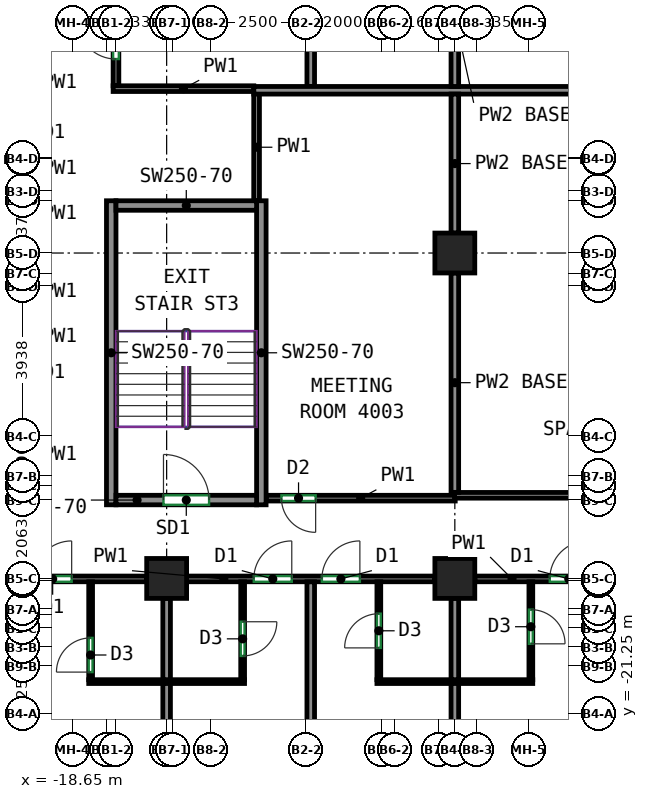
"""IFC4 building model, lengths in metres.
Left out: names, types, materials, properties, quantities, classifications, styles, units other than length and angle.
Written with IfcOpenShell. Run it as: python <this file> out.ifc"""

import sys

from ifc_helpers import new_model, si_unit, direction, frame, frame_2d, origin, origin_2d, place, context, subcontext, project, spatial, rectangle, extrude, source, transform, mapped, element, fill, save


model = new_model("IFC4")
c1 = context("Model", 3, precision=1e-05, world=origin(), true_north=direction((0.0, 1.0)))
c2 = subcontext(c1, "Body", "Model", "MODEL_VIEW")
j1 = project(units=[si_unit("LENGTHUNIT", "METRE"), si_unit("PLANEANGLEUNIT", "RADIAN")], contexts=[c1])
p1 = place(None, origin())
s1 = spatial("IfcSite", under=j1, at=p1, CompositionType="ELEMENT")
p2 = place(p1, origin())
s2 = spatial("IfcBuilding", under=s1, at=p2, CompositionType="ELEMENT")
p3 = place(p2, frame((0.0, 0.0, 171.9)))
s3 = spatial("IfcBuildingStorey", under=s2, at=p3, CompositionType="ELEMENT", Elevation=171.9)
m1 = source(origin(), c2, "Body", "SweptSolid", [
    extrude(rectangle(XDim=1.05, YDim=1.05, at=origin_2d()), origin(), (0.0, 0.0, 1.0), 3.12),
])
for number, where, z_axis, x_axis in (
    (1, (-16.167, -17.688, 0.0), (0.0, 0.0, 1.0), (1.0, 0.0, 0.0)),
    (2, (-8.583, -17.688, 0.0), (0.0, 0.0, 1.0), (1.0, 0.0, 0.0)),
    (3, (-8.583, -9.125, 0.0), (0.0, 0.0, 1.0), (1.0, 0.0, 0.0)),
):
    element("IfcColumn", number, at=place(p3, frame(where, z_axis=z_axis, x_axis=x_axis)), inside=s3, PredefinedType="COLUMN", context=c2, shape_type="MappedRepresentation", body=[
        mapped(m1, transform((0.0, 0.0, 0.0))),
    ])
m2 = source(origin(), c2, "Body", "SweptSolid", [
    extrude(rectangle(XDim=8.0, YDim=0.25, at=frame_2d((4.0, 0.0))), origin(), (0.0, 0.0, 1.0), 3.12),
])
for number, where, z_axis, x_axis in (
    (4, (-17.625, -15.75, 0.0), (0.0, 0.0, 1.0), (0.0, 1.0, 0.0)),
    (5, (-13.675, -15.75, 0.0), (0.0, 0.0, 1.0), (0.0, 1.0, 0.0)),
):
    element("IfcWall", number, at=place(p3, frame(where, z_axis=z_axis, x_axis=x_axis)), inside=s3, PredefinedType="SHEAR", context=c2, shape_type="MappedRepresentation", body=[
        mapped(m2, transform((0.0, 0.0, 0.0))),
    ])
m3 = source(origin(), c2, "Body", "SweptSolid", [
    extrude(rectangle(XDim=3.7, YDim=0.25, at=frame_2d((1.85, 0.0))), origin(), (0.0, 0.0, 1.0), 3.12),
])
p4 = place(p3, frame((-17.5, -15.625, 0.0), z_axis=(0.0, 0.0, 1.0), x_axis=(1.0, 0.0, 0.0)))
e6 = element("IfcWall", 6, at=p4, inside=s3, PredefinedType="SHEAR", context=c2, shape_type="MappedRepresentation", body=[
    mapped(m3, transform((0.0, 0.0, 0.0))),
])
p5 = place(p4, frame((1.25, 0.0, 0.0)))
e7 = element("IfcOpeningElement", 7, at=p5, cuts=e6, PredefinedType="OPENING", context=c2, shape_type="SweptSolid", body=[
    extrude(rectangle(XDim=1.2, YDim=2.1, at=frame_2d((0.6, 1.05))), frame((0.0, 0.135, 0.0), z_axis=(0.0, -1.0, 0.0), x_axis=(1.0, 0.0, 0.0)), (0.0, 0.0, 1.0), 0.27),
])
p6 = place(p3, frame((-17.5, -7.875, 0.0), z_axis=(0.0, 0.0, 1.0), x_axis=(1.0, 0.0, 0.0)))
e8 = element("IfcWall", 8, at=p6, inside=s3, PredefinedType="SHEAR", context=c2, shape_type="MappedRepresentation", body=[
    mapped(m3, transform((0.0, 0.0, 0.0))),
])
p7 = place(p3, frame((-23.75, -17.7, 0.0), z_axis=(0.0, 0.0, 1.0), x_axis=(1.0, 0.0, 0.0)))
e9 = element("IfcWall", 9, at=p7, inside=s3, PredefinedType="PARTITIONING", context=c2, shape_type="SweptSolid", body=[
    extrude(rectangle(XDim=7.058, YDim=0.15, at=frame_2d((3.529, 0.0))), origin(), (0.0, 0.0, 1.0), 2.52),
])
p8 = place(p7, frame((0.3, 0.0, 0.0)))
e10 = element("IfcOpeningElement", 10, at=p8, cuts=e9, PredefinedType="OPENING", context=c2, shape_type="SweptSolid", body=[
    extrude(rectangle(XDim=1.0, YDim=2.1, at=frame_2d((0.5, 1.05))), frame((0.0, 0.085, 0.0), z_axis=(0.0, -1.0, 0.0), x_axis=(1.0, 0.0, 0.0)), (0.0, 0.0, 1.0), 0.17),
])
p9 = place(p7, frame((4.084, 0.0, 0.0)))
e11 = element("IfcOpeningElement", 11, at=p9, cuts=e9, PredefinedType="OPENING", context=c2, shape_type="SweptSolid", body=[
    extrude(rectangle(XDim=1.0, YDim=2.1, at=frame_2d((0.5, 1.05))), frame((0.0, 0.085, 0.0), z_axis=(0.0, -1.0, 0.0), x_axis=(1.0, 0.0, 0.0)), (0.0, 0.0, 1.0), 0.17),
])
p10 = place(p3, frame((-15.642, -17.7, 0.0), z_axis=(0.0, 0.0, 1.0), x_axis=(1.0, 0.0, 0.0)))
e12 = element("IfcWall", 12, at=p10, inside=s3, PredefinedType="PARTITIONING", context=c2, shape_type="SweptSolid", body=[
    extrude(rectangle(XDim=6.534, YDim=0.15, at=frame_2d((3.267, 0.0))), origin(), (0.0, 0.0, 1.0), 3.12),
])
p11 = place(p10, frame((1.768, 0.0, 0.0)))
e13 = element("IfcOpeningElement", 13, at=p11, cuts=e12, PredefinedType="OPENING", context=c2, shape_type="SweptSolid", body=[
    extrude(rectangle(XDim=1.0, YDim=2.1, at=frame_2d((0.5, 1.05))), frame((0.0, 0.085, 0.0), z_axis=(0.0, -1.0, 0.0), x_axis=(1.0, 0.0, 0.0)), (0.0, 0.0, 1.0), 0.17),
])
p12 = place(p10, frame((3.56, 0.0, 0.0)))
e14 = element("IfcOpeningElement", 14, at=p12, cuts=e12, PredefinedType="OPENING", context=c2, shape_type="SweptSolid", body=[
    extrude(rectangle(XDim=1.0, YDim=2.1, at=frame_2d((0.5, 1.05))), frame((0.0, 0.085, 0.0), z_axis=(0.0, -1.0, 0.0), x_axis=(1.0, 0.0, 0.0)), (0.0, 0.0, 1.0), 0.17),
])
p13 = place(p3, frame((-8.058, -17.7, 0.0), z_axis=(0.0, 0.0, 1.0), x_axis=(1.0, 0.0, 0.0)))
e15 = element("IfcWall", 15, at=p13, inside=s3, PredefinedType="PARTITIONING", context=c2, shape_type="SweptSolid", body=[
    extrude(rectangle(XDim=6.533, YDim=0.15, at=frame_2d((3.267, 0.0))), origin(), (0.0, 0.0, 1.0), 3.12),
])
p14 = place(p13, frame((1.973, 0.0, 0.0)))
e16 = element("IfcOpeningElement", 16, at=p14, cuts=e15, PredefinedType="OPENING", context=c2, shape_type="SweptSolid", body=[
    extrude(rectangle(XDim=1.0, YDim=2.1, at=frame_2d((0.5, 1.05))), frame((0.0, 0.085, 0.0), z_axis=(0.0, -1.0, 0.0), x_axis=(1.0, 0.0, 0.0)), (0.0, 0.0, 1.0), 0.17),
])
p15 = place(p13, frame((3.868, 0.0, 0.0)))
e17 = element("IfcOpeningElement", 17, at=p15, cuts=e15, PredefinedType="OPENING", context=c2, shape_type="SweptSolid", body=[
    extrude(rectangle(XDim=1.0, YDim=2.1, at=frame_2d((0.5, 1.05))), frame((0.0, 0.085, 0.0), z_axis=(0.0, -1.0, 0.0), x_axis=(1.0, 0.0, 0.0)), (0.0, 0.0, 1.0), 0.17),
])
p16 = place(p3, frame((-17.5, -4.725, 0.0), z_axis=(0.0, 0.0, 1.0), x_axis=(0.0, 1.0, 0.0)))
e18 = element("IfcWall", 18, at=p16, inside=s3, PredefinedType="PARTITIONING", context=c2, shape_type="SweptSolid", body=[
    extrude(rectangle(XDim=8.35, YDim=0.15, at=frame_2d((4.175, 0.0))), origin(), (0.0, 0.0, 1.0), 3.12),
])
p17 = place(p16, frame((0.704, 0.0, 0.0)))
e19 = element("IfcOpeningElement", 19, at=p17, cuts=e18, PredefinedType="OPENING", context=c2, shape_type="SweptSolid", body=[
    extrude(rectangle(XDim=1.0, YDim=2.1, at=frame_2d((0.5, 1.05))), frame((0.0, 0.085, 0.0), z_axis=(0.0, -1.0, 0.0), x_axis=(1.0, 0.0, 0.0)), (0.0, 0.0, 1.0), 0.17),
])
p18 = place(p3, frame((-17.575, -4.8, 0.0), z_axis=(0.0, 0.0, 1.0), x_axis=(1.0, 0.0, 0.0)))
e20 = element("IfcWall", 20, at=p18, inside=s3, PredefinedType="PARTITIONING", context=c2, shape_type="SweptSolid", body=[
    extrude(rectangle(XDim=3.702, YDim=0.15, at=frame_2d((1.851, 0.0))), origin(), (0.0, 0.0, 1.0), 3.12),
])
p19 = place(p3, frame((-13.8, -7.75, 0.0), z_axis=(0.0, 0.0, 1.0), x_axis=(0.0, 1.0, 0.0)))
e21 = element("IfcWall", 21, at=p19, inside=s3, PredefinedType="PARTITIONING", context=c2, shape_type="SweptSolid", body=[
    extrude(rectangle(XDim=2.817, YDim=0.15, at=frame_2d((1.408, 0.0))), origin(), (0.0, 0.0, 1.0), 3.12),
])
p20 = place(p3, frame((-8.573, -15.575, 0.0), z_axis=(0.0, 0.0, 1.0), x_axis=(-1.0, 0.0, 0.0)))
e22 = element("IfcWall", 22, at=p20, inside=s3, PredefinedType="PARTITIONING", context=c2, shape_type="SweptSolid", body=[
    extrude(rectangle(XDim=4.977, YDim=0.15, at=frame_2d((2.489, 0.0))), origin(), (0.0, 0.0, 1.0), 3.12),
])
p21 = place(p20, frame((3.673, 0.0, 0.0)))
e23 = element("IfcOpeningElement", 23, at=p21, cuts=e22, PredefinedType="OPENING", context=c2, shape_type="SweptSolid", body=[
    extrude(rectangle(XDim=0.9, YDim=2.1, at=frame_2d((0.45, 1.05))), frame((0.0, 0.085, 0.0), z_axis=(0.0, -1.0, 0.0), x_axis=(1.0, 0.0, 0.0)), (0.0, 0.0, 1.0), 0.17),
])
p22 = place(p3, frame((-8.593, -15.5, 0.0), z_axis=(0.0, 0.0, 1.0), x_axis=(1.0, 0.0, 0.0)))
e24 = element("IfcWall", 24, at=p22, inside=s3, PredefinedType="PARTITIONING", context=c2, shape_type="SweptSolid", body=[
    extrude(rectangle(XDim=24.868, YDim=0.15, at=frame_2d((12.434, 0.0))), origin(), (0.0, 0.0, 1.0), 3.12),
])
p23 = place(p22, frame((6.44, 0.0, 0.0)))
e25 = element("IfcOpeningElement", 25, at=p23, cuts=e24, PredefinedType="OPENING", context=c2, shape_type="SweptSolid", body=[
    extrude(rectangle(XDim=0.9, YDim=2.1, at=frame_2d((0.45, 1.05))), frame((0.0, 0.085, 0.0), z_axis=(0.0, -1.0, 0.0), x_axis=(1.0, 0.0, 0.0)), (0.0, 0.0, 1.0), 0.17),
])
p24 = place(p22, frame((16.43, 0.0, 0.0)))
e26 = element("IfcOpeningElement", 26, at=p24, cuts=e24, PredefinedType="OPENING", context=c2, shape_type="SweptSolid", body=[
    extrude(rectangle(XDim=0.9, YDim=2.1, at=frame_2d((0.45, 1.05))), frame((0.0, 0.085, 0.0), z_axis=(0.0, -1.0, 0.0), x_axis=(1.0, 0.0, 0.0)), (0.0, 0.0, 1.0), 0.17),
])
p25 = place(p3, frame((-18.167, -20.352, 0.0), z_axis=(0.0, 0.0, 1.0), x_axis=(0.0, 1.0, 0.0)))
e27 = element("IfcWall", 27, at=p25, inside=s3, PredefinedType="PARTITIONING", context=c2, shape_type="SweptSolid", body=[
    extrude(rectangle(XDim=2.575, YDim=0.1, at=frame_2d((1.288, 0.0))), origin(), (0.0, 0.0, 1.0), 3.12),
])
p26 = place(p25, frame((0.2, 0.0, 0.0)))
e28 = element("IfcOpeningElement", 28, at=p26, cuts=e27, PredefinedType="OPENING", context=c2, shape_type="SweptSolid", body=[
    extrude(rectangle(XDim=0.9, YDim=2.1, at=frame_2d((0.45, 1.05))), frame((0.0, 0.06, 0.0), z_axis=(0.0, -1.0, 0.0), x_axis=(1.0, 0.0, 0.0)), (0.0, 0.0, 1.0), 0.12),
])
p27 = place(p3, frame((-18.217, -20.402, 0.0), z_axis=(0.0, 0.0, 1.0), x_axis=(1.0, 0.0, 0.0)))
e29 = element("IfcWall", 29, at=p27, inside=s3, PredefinedType="PARTITIONING", context=c2, shape_type="SweptSolid", body=[
    extrude(rectangle(XDim=4.1, YDim=0.1, at=frame_2d((2.05, 0.0))), origin(), (0.0, 0.0, 1.0), 3.12),
])
p28 = place(p3, frame((-16.167, -25.4, 0.0), z_axis=(0.0, 0.0, 1.0), x_axis=(0.0, 1.0, 0.0)))
e30 = element("IfcWall", 30, at=p28, inside=s3, PredefinedType="PARTITIONING", context=c2, shape_type="SweptSolid", body=[
    extrude(rectangle(XDim=4.948, YDim=0.2, at=frame_2d((2.474, 0.0))), origin(), (0.0, 0.0, 1.0), 3.12),
])
p29 = place(p3, frame((-16.167, -20.352, 0.0), z_axis=(0.0, 0.0, 1.0), x_axis=(0.0, 1.0, 0.0)))
e31 = element("IfcWall", 31, at=p29, inside=s3, PredefinedType="PARTITIONING", context=c2, shape_type="SweptSolid", body=[
    extrude(rectangle(XDim=2.14, YDim=0.2, at=frame_2d((1.07, 0.0))), origin(), (0.0, 0.0, 1.0), 3.12),
])
p30 = place(p3, frame((-14.167, -17.777, 0.0), z_axis=(0.0, 0.0, 1.0), x_axis=(0.0, -1.0, 0.0)))
e32 = element("IfcWall", 32, at=p30, inside=s3, PredefinedType="PARTITIONING", context=c2, shape_type="SweptSolid", body=[
    extrude(rectangle(XDim=2.575, YDim=0.1, at=frame_2d((1.288, 0.0))), origin(), (0.0, 0.0, 1.0), 3.12),
])
p31 = place(p30, frame((1.05, 0.0, 0.0)))
e33 = element("IfcOpeningElement", 33, at=p31, cuts=e32, PredefinedType="OPENING", context=c2, shape_type="SweptSolid", body=[
    extrude(rectangle(XDim=0.9, YDim=2.1, at=frame_2d((0.45, 1.05))), frame((0.0, 0.06, 0.0), z_axis=(0.0, -1.0, 0.0), x_axis=(1.0, 0.0, 0.0)), (0.0, 0.0, 1.0), 0.12),
])
p32 = place(p3, frame((-12.375, -26.0, 0.0), z_axis=(0.0, 0.0, 1.0), x_axis=(0.0, 1.0, 0.0)))
e34 = element("IfcWall", 34, at=p32, inside=s3, PredefinedType="PARTITIONING", context=c2, shape_type="SweptSolid", body=[
    extrude(rectangle(XDim=8.223, YDim=0.2, at=frame_2d((4.111, 0.0))), origin(), (0.0, 0.0, 1.0), 3.12),
])
p33 = place(p3, frame((-10.583, -20.352, 0.0), z_axis=(0.0, 0.0, 1.0), x_axis=(0.0, 1.0, 0.0)))
e35 = element("IfcWall", 35, at=p33, inside=s3, PredefinedType="PARTITIONING", context=c2, shape_type="SweptSolid", body=[
    extrude(rectangle(XDim=2.575, YDim=0.1, at=frame_2d((1.288, 0.0))), origin(), (0.0, 0.0, 1.0), 3.12),
])
p34 = place(p33, frame((0.837, 0.0, 0.0)))
e36 = element("IfcOpeningElement", 36, at=p34, cuts=e35, PredefinedType="OPENING", context=c2, shape_type="SweptSolid", body=[
    extrude(rectangle(XDim=0.9, YDim=2.1, at=frame_2d((0.45, 1.05))), frame((0.0, 0.06, 0.0), z_axis=(0.0, -1.0, 0.0), x_axis=(1.0, 0.0, 0.0)), (0.0, 0.0, 1.0), 0.12),
])
p35 = place(p3, frame((-10.633, -20.402, 0.0), z_axis=(0.0, 0.0, 1.0), x_axis=(1.0, 0.0, 0.0)))
e37 = element("IfcWall", 37, at=p35, inside=s3, PredefinedType="PARTITIONING", context=c2, shape_type="SweptSolid", body=[
    extrude(rectangle(XDim=4.1, YDim=0.1, at=frame_2d((2.05, 0.0))), origin(), (0.0, 0.0, 1.0), 3.12),
])
p36 = place(p3, frame((-8.583, -25.4, 0.0), z_axis=(0.0, 0.0, 1.0), x_axis=(0.0, 1.0, 0.0)))
e38 = element("IfcWall", 38, at=p36, inside=s3, PredefinedType="PARTITIONING", context=c2, shape_type="SweptSolid", body=[
    extrude(rectangle(XDim=4.948, YDim=0.2, at=frame_2d((2.474, 0.0))), origin(), (0.0, 0.0, 1.0), 3.12),
])
p37 = place(p3, frame((-8.583, -20.352, 0.0), z_axis=(0.0, 0.0, 1.0), x_axis=(0.0, 1.0, 0.0)))
e39 = element("IfcWall", 39, at=p37, inside=s3, PredefinedType="PARTITIONING", context=c2, shape_type="SweptSolid", body=[
    extrude(rectangle(XDim=2.14, YDim=0.2, at=frame_2d((1.07, 0.0))), origin(), (0.0, 0.0, 1.0), 3.12),
])
p38 = place(p3, frame((-6.583, -17.777, 0.0), z_axis=(0.0, 0.0, 1.0), x_axis=(0.0, -1.0, 0.0)))
e40 = element("IfcWall", 40, at=p38, inside=s3, PredefinedType="PARTITIONING", context=c2, shape_type="SweptSolid", body=[
    extrude(rectangle(XDim=2.575, YDim=0.1, at=frame_2d((1.288, 0.0))), origin(), (0.0, 0.0, 1.0), 3.12),
])
p39 = place(p38, frame((0.731, 0.0, 0.0)))
e41 = element("IfcOpeningElement", 41, at=p39, cuts=e40, PredefinedType="OPENING", context=c2, shape_type="SweptSolid", body=[
    extrude(rectangle(XDim=0.9, YDim=2.1, at=frame_2d((0.45, 1.05))), frame((0.0, 0.06, 0.0), z_axis=(0.0, -1.0, 0.0), x_axis=(1.0, 0.0, 0.0)), (0.0, 0.0, 1.0), 0.12),
])
p40 = place(p3, frame((-12.375, -4.743, 0.0), z_axis=(0.0, 0.0, 1.0), x_axis=(0.0, 1.0, 0.0)))
e42 = element("IfcWall", 42, at=p40, inside=s3, PredefinedType="PARTITIONING", context=c2, shape_type="SweptSolid", body=[
    extrude(rectangle(XDim=8.366, YDim=0.2, at=frame_2d((4.183, 0.0))), origin(), (0.0, 0.0, 1.0), 3.12),
])
p41 = place(p3, frame((-13.873, -4.843, 0.0), z_axis=(0.0, 0.0, 1.0), x_axis=(1.0, 0.0, 0.0)))
e43 = element("IfcWall", 43, at=p41, inside=s3, PredefinedType="PARTITIONING", context=c2, shape_type="SweptSolid", body=[
    extrude(rectangle(XDim=30.146, YDim=0.2, at=frame_2d((15.073, 0.0))), origin(), (0.0, 0.0, 1.0), 3.12),
])
p42 = place(p3, frame((-8.583, -4.743, 0.0), z_axis=(0.0, 0.0, 1.0), x_axis=(0.0, 1.0, 0.0)))
e44 = element("IfcWall", 44, at=p42, inside=s3, PredefinedType="PARTITIONING", context=c2, shape_type="SweptSolid", body=[
    extrude(rectangle(XDim=3.656, YDim=0.2, at=frame_2d((1.828, 0.0))), origin(), (0.0, 0.0, 1.0), 2.52),
])
p43 = place(p3, frame((-8.583, -8.6, 0.0), z_axis=(0.0, 0.0, 1.0), x_axis=(0.0, 1.0, 0.0)))
e45 = element("IfcWall", 45, at=p43, inside=s3, PredefinedType="PARTITIONING", context=c2, shape_type="SweptSolid", body=[
    extrude(rectangle(XDim=3.657, YDim=0.2, at=frame_2d((1.829, 0.0))), origin(), (0.0, 0.0, 1.0), 2.52),
])
p44 = place(p3, frame((-8.583, -15.423, 0.0), z_axis=(0.0, 0.0, 1.0), x_axis=(0.0, 1.0, 0.0)))
e46 = element("IfcWall", 46, at=p44, inside=s3, PredefinedType="PARTITIONING", context=c2, shape_type="SweptSolid", body=[
    extrude(rectangle(XDim=5.773, YDim=0.2, at=frame_2d((2.887, 0.0))), origin(), (0.0, 0.0, 1.0), 2.52),
])
p45 = place(p5, origin())
e47 = element("IfcDoor", 47, at=p45, inside=s3, OperationType="DOUBLE_DOOR_SINGLE_SWING", PredefinedType="DOOR", context=c2, shape_type="SweptSolid", body=[
    extrude(rectangle(XDim=1.2, YDim=2.1, at=frame_2d((0.6, 1.05))), frame((0.0, 0.025, 0.0), z_axis=(0.0, -1.0, 0.0), x_axis=(1.0, 0.0, 0.0)), (0.0, 0.0, 1.0), 0.05),
])
fill(e7, e47)
p46 = place(p26, origin())
e48 = element("IfcDoor", 48, at=p46, inside=s3, OperationType="SINGLE_SWING_LEFT", PredefinedType="DOOR", context=c2, shape_type="SweptSolid", body=[
    extrude(rectangle(XDim=0.9, YDim=2.1, at=frame_2d((0.45, 1.05))), frame((0.0, 0.025, 0.0), z_axis=(0.0, -1.0, 0.0), x_axis=(1.0, 0.0, 0.0)), (0.0, 0.0, 1.0), 0.05),
])
fill(e28, e48)
p47 = place(p31, origin())
e49 = element("IfcDoor", 49, at=p47, inside=s3, OperationType="SINGLE_SWING_LEFT", PredefinedType="DOOR", context=c2, shape_type="SweptSolid", body=[
    extrude(rectangle(XDim=0.9, YDim=2.1, at=frame_2d((0.45, 1.05))), frame((0.0, 0.025, 0.0), z_axis=(0.0, -1.0, 0.0), x_axis=(1.0, 0.0, 0.0)), (0.0, 0.0, 1.0), 0.05),
])
fill(e33, e49)
p48 = place(p34, origin())
e50 = element("IfcDoor", 50, at=p48, inside=s3, OperationType="SINGLE_SWING_LEFT", PredefinedType="DOOR", context=c2, shape_type="SweptSolid", body=[
    extrude(rectangle(XDim=0.9, YDim=2.1, at=frame_2d((0.45, 1.05))), frame((0.0, 0.025, 0.0), z_axis=(0.0, -1.0, 0.0), x_axis=(1.0, 0.0, 0.0)), (0.0, 0.0, 1.0), 0.05),
])
fill(e36, e50)
p49 = place(p39, origin())
e51 = element("IfcDoor", 51, at=p49, inside=s3, OperationType="SINGLE_SWING_RIGHT", PredefinedType="DOOR", context=c2, shape_type="SweptSolid", body=[
    extrude(rectangle(XDim=0.9, YDim=2.1, at=frame_2d((0.45, 1.05))), frame((0.0, 0.025, 0.0), z_axis=(0.0, -1.0, 0.0), x_axis=(1.0, 0.0, 0.0)), (0.0, 0.0, 1.0), 0.05),
])
fill(e41, e51)
p50 = place(p9, origin())
e52 = element("IfcDoor", 52, at=p50, inside=s3, OperationType="SINGLE_SWING_RIGHT", PredefinedType="DOOR", context=c2, shape_type="SweptSolid", body=[
    extrude(rectangle(XDim=1.0, YDim=2.1, at=frame_2d((0.5, 1.05))), frame((0.0, 0.025, 0.0), z_axis=(0.0, -1.0, 0.0), x_axis=(1.0, 0.0, 0.0)), (0.0, 0.0, 1.0), 0.05),
])
fill(e11, e52)
p51 = place(p11, origin())
e53 = element("IfcDoor", 53, at=p51, inside=s3, OperationType="SINGLE_SWING_RIGHT", PredefinedType="DOOR", context=c2, shape_type="SweptSolid", body=[
    extrude(rectangle(XDim=1.0, YDim=2.1, at=frame_2d((0.5, 1.05))), frame((0.0, 0.025, 0.0), z_axis=(0.0, -1.0, 0.0), x_axis=(1.0, 0.0, 0.0)), (0.0, 0.0, 1.0), 0.05),
])
fill(e13, e53)
p52 = place(p12, origin())
e54 = element("IfcDoor", 54, at=p52, inside=s3, OperationType="SINGLE_SWING_RIGHT", PredefinedType="DOOR", context=c2, shape_type="SweptSolid", body=[
    extrude(rectangle(XDim=1.0, YDim=2.1, at=frame_2d((0.5, 1.05))), frame((0.0, 0.025, 0.0), z_axis=(0.0, -1.0, 0.0), x_axis=(1.0, 0.0, 0.0)), (0.0, 0.0, 1.0), 0.05),
])
fill(e14, e54)
p53 = place(p14, origin())
e55 = element("IfcDoor", 55, at=p53, inside=s3, OperationType="SINGLE_SWING_RIGHT", PredefinedType="DOOR", context=c2, shape_type="SweptSolid", body=[
    extrude(rectangle(XDim=1.0, YDim=2.1, at=frame_2d((0.5, 1.05))), frame((0.0, 0.025, 0.0), z_axis=(0.0, -1.0, 0.0), x_axis=(1.0, 0.0, 0.0)), (0.0, 0.0, 1.0), 0.05),
])
fill(e16, e55)
p54 = place(p21, origin())
e56 = element("IfcDoor", 56, at=p54, inside=s3, OperationType="SINGLE_SWING_LEFT", PredefinedType="DOOR", context=c2, shape_type="SweptSolid", body=[
    extrude(rectangle(XDim=0.9, YDim=2.1, at=frame_2d((0.45, 1.05))), frame((0.0, 0.025, 0.0), z_axis=(0.0, -1.0, 0.0), x_axis=(1.0, 0.0, 0.0)), (0.0, 0.0, 1.0), 0.05),
])
fill(e23, e56)
p55 = place(p17, origin())
e57 = element("IfcDoor", 57, at=p55, inside=s3, OperationType="SINGLE_SWING_RIGHT", PredefinedType="DOOR", context=c2, shape_type="SweptSolid", body=[
    extrude(rectangle(XDim=1.0, YDim=2.1, at=frame_2d((0.5, 1.05))), frame((0.0, 0.025, 0.0), z_axis=(0.0, -1.0, 0.0), x_axis=(1.0, 0.0, 0.0)), (0.0, 0.0, 1.0), 0.05),
])
fill(e19, e57)
save(model, sys.argv[1])
